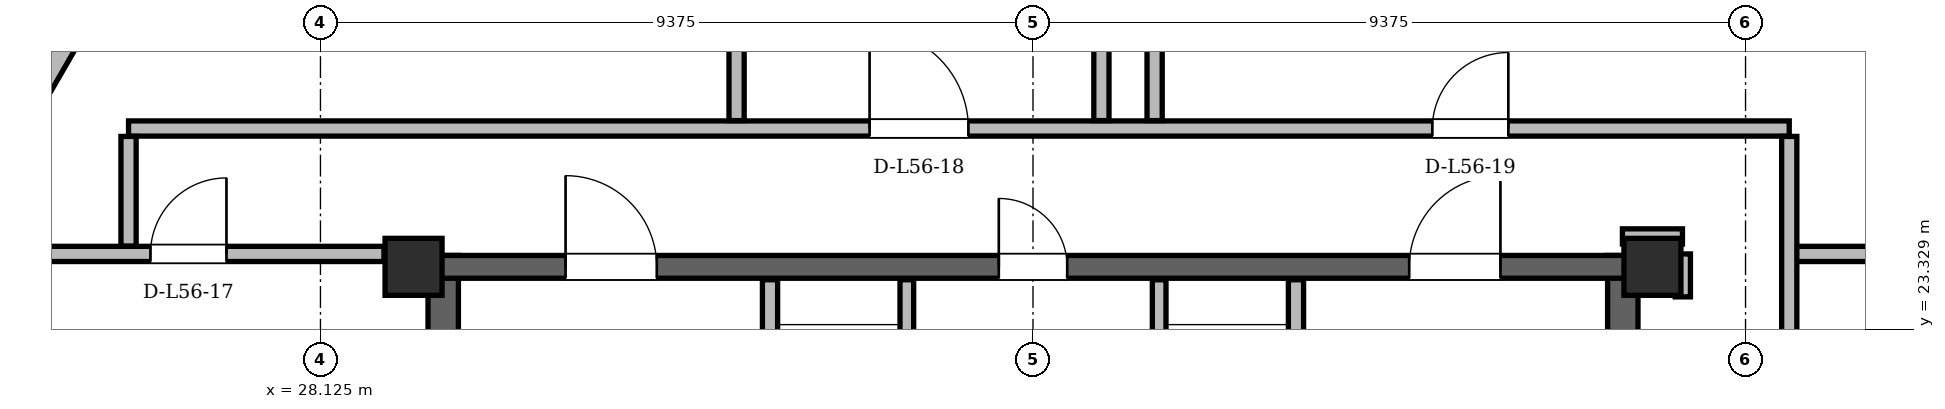
"""IFC4 building model, lengths in metres.
Left out: names, types, materials, properties, quantities, classifications, styles, units other than length and angle.
Written with IfcOpenShell. Run it as: python <this file> out.ifc"""

import sys

from ifc_helpers import new_model, si_unit, direction, frame, frame_2d, origin, origin_2d, place, context, subcontext, project, spatial, rectangle, hollow_rectangle, extrude, element, fill, save


model = new_model("IFC4")
c1 = context("Model", 3, precision=1e-05, world=origin(), true_north=direction((0.0, 1.0)))
c2 = subcontext(c1, "Body", "Model", "MODEL_VIEW")
j1 = project(units=[si_unit("LENGTHUNIT", "METRE"), si_unit("PLANEANGLEUNIT", "RADIAN")], contexts=[c1])
p1 = place(None, origin())
s1 = spatial("IfcSite", under=j1, at=p1, CompositionType="ELEMENT")
p2 = place(p1, origin())
s2 = spatial("IfcBuilding", under=s1, at=p2, CompositionType="ELEMENT")
p3 = place(p2, frame((0.0, 0.0, 212.7)))
s3 = spatial("IfcBuildingStorey", under=s2, at=p3, CompositionType="ELEMENT", Elevation=212.7)
for number, where, z_axis, x_axis in (
    (1, (45.65, 24.15, 0.0), (0.0, 0.0, 1.0), (1.0, 0.0, 0.0)),
    (2, (29.35, 24.15, 0.0), (0.0, 0.0, 1.0), (1.0, 0.0, 0.0)),
):
    element("IfcColumn", number, at=place(p3, frame(where, z_axis=z_axis, x_axis=x_axis)), inside=s3, PredefinedType="COLUMN", context=c2, shape_type="SweptSolid", body=[
        extrude(hollow_rectangle(XDim=0.75, YDim=0.75, WallThickness=0.06, at=origin_2d()), origin(), (0.0, 0.0, 1.0), 3.6),
    ])
for number, where, z_axis, x_axis in (
    (3, (29.74, 11.0, 0.0), (0.0, 0.0, 1.0), (0.0, 1.0, 0.0)),
    (4, (45.26, 11.0, 0.0), (0.0, 0.0, 1.0), (0.0, 1.0, 0.0)),
):
    element("IfcWall", number, at=place(p3, frame(where, z_axis=z_axis, x_axis=x_axis)), inside=s3, PredefinedType="SHEAR", context=c2, shape_type="SweptSolid", body=[
        extrude(rectangle(XDim=13.3, YDim=0.4, at=frame_2d((6.65, 0.0))), origin(), (0.0, 0.0, 1.0), 3.38),
    ])
p4 = place(p3, frame((29.65, 24.15, 0.0), z_axis=(0.0, 0.0, 1.0), x_axis=(1.0, 0.0, 0.0)))
e5 = element("IfcWall", 5, at=p4, inside=s3, PredefinedType="SHEAR", context=c2, shape_type="SweptSolid", body=[
    extrude(rectangle(XDim=15.7, YDim=0.3, at=frame_2d((7.85, 0.0))), origin(), (0.0, 0.0, 1.0), 3.38),
])
p5 = place(p4, frame((1.7, 0.0, 0.0)))
e6 = element("IfcOpeningElement", 6, at=p5, cuts=e5, PredefinedType="OPENING", context=c2, shape_type="SweptSolid", body=[
    extrude(rectangle(XDim=1.2, YDim=2.2, at=frame_2d((0.6, 1.1))), frame((0.0, 0.15, 0.0), z_axis=(0.0, -1.0, 0.0), x_axis=(1.0, 0.0, 0.0)), (0.0, 0.0, 1.0), 0.3),
])
p6 = place(p4, frame((12.8, 0.0, 0.0)))
e7 = element("IfcOpeningElement", 7, at=p6, cuts=e5, PredefinedType="OPENING", context=c2, shape_type="SweptSolid", body=[
    extrude(rectangle(XDim=1.2, YDim=2.2, at=frame_2d((0.6, 1.1))), frame((0.0, 0.15, 0.0), z_axis=(0.0, -1.0, 0.0), x_axis=(1.0, 0.0, 0.0)), (0.0, 0.0, 1.0), 0.3),
])
p7 = place(p4, frame((7.4, 0.0, 0.0)))
e8 = element("IfcOpeningElement", 8, at=p7, cuts=e5, PredefinedType="OPENING", context=c2, shape_type="SweptSolid", body=[
    extrude(rectangle(XDim=0.9, YDim=2.05, at=frame_2d((0.45, 1.025))), frame((0.0, 0.15, 0.0), z_axis=(0.0, -1.0, 0.0), x_axis=(1.0, 0.0, 0.0)), (0.0, 0.0, 1.0), 0.3),
])
p8 = place(p3, frame((59.201, 11.543, 0.0), z_axis=(0.0, 0.0, 1.0), x_axis=(-0.499999040053, 0.866025958009, 0.0)))
e9 = element("IfcWall", 9, at=p8, inside=s3, PredefinedType="SOLIDWALL", context=c2, shape_type="SweptSolid", body=[
    extrude(rectangle(XDim=36.523, YDim=0.29, at=frame_2d((18.261, 0.0))), origin(), (0.0, 0.0, 1.0), 2.677),
])
p9 = place(p8, frame((8.034, 0.0, 0.0)))
e10 = element("IfcOpeningElement", 10, at=p9, cuts=e9, PredefinedType="OPENING", context=c2, shape_type="SweptSolid", body=[
    extrude(rectangle(XDim=1.5, YDim=2.2, at=frame_2d((0.75, 1.1))), frame((0.0, 0.145, 0.0), z_axis=(0.0, -1.0, 0.0), x_axis=(1.0, 0.0, 0.0)), (0.0, 0.0, 1.0), 0.29),
])
p10 = place(p8, frame((31.594, 0.0, 0.0)))
e11 = element("IfcOpeningElement", 11, at=p10, cuts=e9, PredefinedType="OPENING", context=c2, shape_type="SweptSolid", body=[
    extrude(rectangle(XDim=1.5, YDim=2.2, at=frame_2d((0.75, 1.1))), frame((0.0, 0.145, 0.0), z_axis=(0.0, -1.0, 0.0), x_axis=(1.0, 0.0, 0.0)), (0.0, 0.0, 1.0), 0.29),
])
p11 = place(p8, frame((12.291, 0.0, 0.85)))
e12 = element("IfcOpeningElement", 12, at=p11, cuts=e9, PredefinedType="OPENING", context=c2, shape_type="SweptSolid", body=[
    extrude(rectangle(XDim=1.4, YDim=1.6, at=frame_2d((0.7, 0.8))), frame((0.0, 0.145, 0.0), z_axis=(0.0, -1.0, 0.0), x_axis=(1.0, 0.0, 0.0)), (0.0, 0.0, 1.0), 0.29),
])
p12 = place(p8, frame((2.252, 0.0, 0.85)))
e13 = element("IfcOpeningElement", 13, at=p12, cuts=e9, PredefinedType="OPENING", context=c2, shape_type="SweptSolid", body=[
    extrude(rectangle(XDim=1.2, YDim=1.48, at=frame_2d((0.6, 0.74))), frame((0.0, 0.145, 0.0), z_axis=(0.0, -1.0, 0.0), x_axis=(1.0, 0.0, 0.0)), (0.0, 0.0, 1.0), 0.29),
])
p13 = place(p8, frame((16.093, 0.0, 0.85)))
e14 = element("IfcOpeningElement", 14, at=p13, cuts=e9, PredefinedType="OPENING", context=c2, shape_type="SweptSolid", body=[
    extrude(rectangle(XDim=3.0, YDim=1.717, at=frame_2d((1.5, 0.858))), frame((0.0, 0.145, 0.0), z_axis=(0.0, -1.0, 0.0), x_axis=(1.0, 0.0, 0.0)), (0.0, 0.0, 1.0), 0.29),
])
p14 = place(p8, frame((23.458, 0.0, 0.85)))
e15 = element("IfcOpeningElement", 15, at=p14, cuts=e9, PredefinedType="OPENING", context=c2, shape_type="SweptSolid", body=[
    extrude(rectangle(XDim=1.2, YDim=1.48, at=frame_2d((0.6, 0.74))), frame((0.0, 0.145, 0.0), z_axis=(0.0, -1.0, 0.0), x_axis=(1.0, 0.0, 0.0)), (0.0, 0.0, 1.0), 0.29),
])
p15 = place(p8, frame((34.061, 0.0, 0.85)))
e16 = element("IfcOpeningElement", 16, at=p15, cuts=e9, PredefinedType="OPENING", context=c2, shape_type="SweptSolid", body=[
    extrude(rectangle(XDim=1.2, YDim=1.48, at=frame_2d((0.6, 0.74))), frame((0.0, 0.145, 0.0), z_axis=(0.0, -1.0, 0.0), x_axis=(1.0, 0.0, 0.0)), (0.0, 0.0, 1.0), 0.29),
])
p16 = place(p3, frame((34.06, 43.173, 0.0), z_axis=(0.0, 0.0, 1.0), x_axis=(-0.499999040053, -0.866025958009, 0.0)))
e17 = element("IfcWall", 17, at=p16, inside=s3, PredefinedType="SOLIDWALL", context=c2, shape_type="SweptSolid", body=[
    extrude(rectangle(XDim=36.523, YDim=0.29, at=frame_2d((18.261, 0.0))), origin(), (0.0, 0.0, 1.0), 2.677),
])
p17 = place(p16, frame((8.034, 0.0, 0.0)))
e18 = element("IfcOpeningElement", 18, at=p17, cuts=e17, PredefinedType="OPENING", context=c2, shape_type="SweptSolid", body=[
    extrude(rectangle(XDim=1.5, YDim=2.2, at=frame_2d((0.75, 1.1))), frame((0.0, 0.145, 0.0), z_axis=(0.0, -1.0, 0.0), x_axis=(1.0, 0.0, 0.0)), (0.0, 0.0, 1.0), 0.29),
])
p18 = place(p16, frame((28.233, 0.0, 0.0)))
e19 = element("IfcOpeningElement", 19, at=p18, cuts=e17, PredefinedType="OPENING", context=c2, shape_type="SweptSolid", body=[
    extrude(rectangle(XDim=1.5, YDim=2.2, at=frame_2d((0.75, 1.1))), frame((0.0, 0.145, 0.0), z_axis=(0.0, -1.0, 0.0), x_axis=(1.0, 0.0, 0.0)), (0.0, 0.0, 1.0), 0.29),
])
p19 = place(p16, frame((32.257, 0.0, 0.85)))
e20 = element("IfcOpeningElement", 20, at=p19, cuts=e17, PredefinedType="OPENING", context=c2, shape_type="SweptSolid", body=[
    extrude(rectangle(XDim=2.2, YDim=1.717, at=frame_2d((1.1, 0.858))), frame((0.0, 0.145, 0.0), z_axis=(0.0, -1.0, 0.0), x_axis=(1.0, 0.0, 0.0)), (0.0, 0.0, 1.0), 0.29),
])
p20 = place(p16, frame((22.716, 0.0, 0.85)))
e21 = element("IfcOpeningElement", 21, at=p20, cuts=e17, PredefinedType="OPENING", context=c2, shape_type="SweptSolid", body=[
    extrude(rectangle(XDim=1.2, YDim=1.48, at=frame_2d((0.6, 0.74))), frame((0.0, 0.145, 0.0), z_axis=(0.0, -1.0, 0.0), x_axis=(1.0, 0.0, 0.0)), (0.0, 0.0, 1.0), 0.29),
])
p21 = place(p16, frame((26.483, 0.0, 0.85)))
e22 = element("IfcOpeningElement", 22, at=p21, cuts=e17, PredefinedType="OPENING", context=c2, shape_type="SweptSolid", body=[
    extrude(rectangle(XDim=1.2, YDim=1.48, at=frame_2d((0.6, 0.74))), frame((0.0, 0.145, 0.0), z_axis=(0.0, -1.0, 0.0), x_axis=(1.0, 0.0, 0.0)), (0.0, 0.0, 1.0), 0.29),
])
p22 = place(p3, frame((34.04, 19.48, 0.0), z_axis=(0.0, 0.0, 1.0), x_axis=(0.0, 1.0, 0.0)))
e23 = element("IfcWall", 23, at=p22, inside=s3, PredefinedType="PARTITIONING", context=c2, shape_type="SweptSolid", body=[
    extrude(rectangle(XDim=4.5, YDim=0.2, at=frame_2d((2.25, 0.0))), origin(), (0.0, 0.0, 1.0), 3.38),
])
p23 = place(p22, frame((2.12, 0.0, 0.0)))
e24 = element("IfcOpeningElement", 24, at=p23, cuts=e23, PredefinedType="OPENING", context=c2, shape_type="SweptSolid", body=[
    extrude(rectangle(XDim=1.1, YDim=2.2, at=frame_2d((0.55, 1.1))), frame((0.0, 0.1, 0.0), z_axis=(0.0, -1.0, 0.0), x_axis=(1.0, 0.0, 0.0)), (0.0, 0.0, 1.0), 0.2),
])
p24 = place(p3, frame((35.84, 20.96, 0.0), z_axis=(0.0, 0.0, 1.0), x_axis=(0.0, 1.0, 0.0)))
e25 = element("IfcWall", 25, at=p24, inside=s3, PredefinedType="PARTITIONING", context=c2, shape_type="SweptSolid", body=[
    extrude(rectangle(XDim=3.02, YDim=0.18, at=frame_2d((1.51, 0.0))), origin(), (0.0, 0.0, 1.0), 3.38),
])
p25 = place(p3, frame((40.96, 19.48, 0.0), z_axis=(0.0, 0.0, 1.0), x_axis=(0.0, 1.0, 0.0)))
e26 = element("IfcWall", 26, at=p25, inside=s3, PredefinedType="PARTITIONING", context=c2, shape_type="SweptSolid", body=[
    extrude(rectangle(XDim=4.5, YDim=0.2, at=frame_2d((2.25, 0.0))), origin(), (0.0, 0.0, 1.0), 3.38),
])
p26 = place(p25, frame((2.12, 0.0, 0.0)))
e27 = element("IfcOpeningElement", 27, at=p26, cuts=e26, PredefinedType="OPENING", context=c2, shape_type="SweptSolid", body=[
    extrude(rectangle(XDim=1.1, YDim=2.2, at=frame_2d((0.55, 1.1))), frame((0.0, 0.1, 0.0), z_axis=(0.0, -1.0, 0.0), x_axis=(1.0, 0.0, 0.0)), (0.0, 0.0, 1.0), 0.2),
])
p27 = place(p3, frame((39.16, 20.96, 0.0), z_axis=(0.0, 0.0, 1.0), x_axis=(0.0, 1.0, 0.0)))
e28 = element("IfcWall", 28, at=p27, inside=s3, PredefinedType="PARTITIONING", context=c2, shape_type="SweptSolid", body=[
    extrude(rectangle(XDim=3.02, YDim=0.18, at=frame_2d((1.51, 0.0))), origin(), (0.0, 0.0, 1.0), 3.38),
])
p28 = place(p3, frame((23.348, 24.32, 0.0), z_axis=(0.0, 0.0, 1.0), x_axis=(1.0, 0.0, 0.0)))
e29 = element("IfcWall", 29, at=p28, inside=s3, PredefinedType="PARTITIONING", context=c2, shape_type="SweptSolid", body=[
    extrude(rectangle(XDim=5.612, YDim=0.2, at=frame_2d((2.806, 0.0))), origin(), (0.0, 0.0, 1.0), 3.38),
])
p29 = place(p28, frame((2.54, 0.0, 0.0)))
e30 = element("IfcOpeningElement", 30, at=p29, cuts=e29, PredefinedType="OPENING", context=c2, shape_type="SweptSolid", body=[
    extrude(rectangle(XDim=1.0, YDim=2.18, at=frame_2d((0.5, 1.09))), frame((0.0, 0.1, 0.0), z_axis=(0.0, -1.0, 0.0), x_axis=(1.0, 0.0, 0.0)), (0.0, 0.0, 1.0), 0.2),
])
p30 = place(p3, frame((47.45, 24.32, 0.0), z_axis=(0.0, 0.0, 1.0), x_axis=(1.0, 0.0, 0.0)))
e31 = element("IfcWall", 31, at=p30, inside=s3, PredefinedType="PARTITIONING", context=c2, shape_type="SweptSolid", body=[
    extrude(rectangle(XDim=4.202, YDim=0.2, at=frame_2d((2.101, 0.0))), origin(), (0.0, 0.0, 1.0), 3.38),
])
p31 = place(p3, frame((45.255, 24.55, 0.0), z_axis=(0.0, 0.0, 1.0), x_axis=(1.0, 0.0, 0.0)))
e32 = element("IfcWall", 32, at=p31, inside=s3, PredefinedType="PARTITIONING", context=c2, shape_type="SweptSolid", body=[
    extrude(rectangle(XDim=0.79, YDim=0.2, at=frame_2d((0.395, 0.0))), origin(), (0.0, 0.0, 1.0), 2.913),
])
p32 = place(p3, frame((25.6, 25.97, 0.0), z_axis=(0.0, 0.0, 1.0), x_axis=(1.0, 0.0, 0.0)))
e33 = element("IfcWall", 33, at=p32, inside=s3, PredefinedType="PARTITIONING", context=c2, shape_type="SweptSolid", body=[
    extrude(rectangle(XDim=21.85, YDim=0.2, at=frame_2d((10.925, 0.0))), origin(), (0.0, 0.0, 1.0), 2.913),
])
p33 = place(p32, frame((9.75, 0.0, 0.0)))
e34 = element("IfcOpeningElement", 34, at=p33, cuts=e33, PredefinedType="OPENING", context=c2, shape_type="SweptSolid", body=[
    extrude(rectangle(XDim=1.3, YDim=2.2, at=frame_2d((0.65, 1.1))), frame((0.0, 0.1, 0.0), z_axis=(0.0, -1.0, 0.0), x_axis=(1.0, 0.0, 0.0)), (0.0, 0.0, 1.0), 0.2),
])
p34 = place(p32, frame((17.154, 0.0, 0.0)))
e35 = element("IfcOpeningElement", 35, at=p34, cuts=e33, PredefinedType="OPENING", context=c2, shape_type="SweptSolid", body=[
    extrude(rectangle(XDim=1.0, YDim=2.18, at=frame_2d((0.5, 1.09))), frame((0.0, 0.1, 0.0), z_axis=(0.0, -1.0, 0.0), x_axis=(1.0, 0.0, 0.0)), (0.0, 0.0, 1.0), 0.2),
])
p35 = place(p3, frame((25.6, 24.424, 0.0), z_axis=(0.0, 0.0, 1.0), x_axis=(0.0, 1.0, 0.0)))
e36 = element("IfcWall", 36, at=p35, inside=s3, PredefinedType="PARTITIONING", context=c2, shape_type="SweptSolid", body=[
    extrude(rectangle(XDim=1.442, YDim=0.2, at=frame_2d((0.721, 0.0))), origin(), (0.0, 0.0, 1.0), 3.38),
])
for number, where, z_axis, x_axis in (
    (37, (33.6, 26.074, 0.0), (0.0, 0.0, 1.0), (0.0, 1.0, 0.0)),
    (38, (38.4, 26.074, 0.0), (0.0, 0.0, 1.0), (0.0, 1.0, 0.0)),
):
    element("IfcWall", number, at=place(p3, frame(where, z_axis=z_axis, x_axis=x_axis)), inside=s3, PredefinedType="PARTITIONING", context=c2, shape_type="SweptSolid", body=[
        extrude(rectangle(XDim=4.292, YDim=0.2, at=frame_2d((2.146, 0.0))), origin(), (0.0, 0.0, 1.0), 3.38),
    ])
p36 = place(p3, frame((39.1, 26.074, 0.0), z_axis=(0.0, 0.0, 1.0), x_axis=(0.0, 1.0, 0.0)))
e39 = element("IfcWall", 39, at=p36, inside=s3, PredefinedType="PARTITIONING", context=c2, shape_type="SweptSolid", body=[
    extrude(rectangle(XDim=16.949, YDim=0.2, at=frame_2d((8.475, 0.0))), origin(), (0.0, 0.0, 1.0), 3.38),
])
p37 = place(p3, frame((46.05, 23.755, 0.0), z_axis=(0.0, 0.0, 1.0), x_axis=(0.0, 1.0, 0.0)))
e40 = element("IfcWall", 40, at=p37, inside=s3, PredefinedType="PARTITIONING", context=c2, shape_type="SweptSolid", body=[
    extrude(rectangle(XDim=0.565, YDim=0.2, at=frame_2d((0.283, 0.0))), origin(), (0.0, 0.0, 1.0), 3.38),
])
p38 = place(p3, frame((47.45, 9.404, 0.0), z_axis=(0.0, 0.0, 1.0), x_axis=(0.0, 1.0, 0.0)))
e41 = element("IfcWall", 41, at=p38, inside=s3, PredefinedType="PARTITIONING", context=c2, shape_type="SweptSolid", body=[
    extrude(rectangle(XDim=16.462, YDim=0.2, at=frame_2d((8.231, 0.0))), origin(), (0.0, 0.0, 1.0), 2.913),
])
p39 = place(p38, frame((9.496, 0.0, 0.0)))
e42 = element("IfcOpeningElement", 42, at=p39, cuts=e41, PredefinedType="OPENING", context=c2, shape_type="SweptSolid", body=[
    extrude(rectangle(XDim=1.0, YDim=2.18, at=frame_2d((0.5, 1.09))), frame((0.0, 0.1, 0.0), z_axis=(0.0, -1.0, 0.0), x_axis=(1.0, 0.0, 0.0)), (0.0, 0.0, 1.0), 0.2),
])
p40 = place(p5, origin())
e43 = element("IfcDoor", 43, at=p40, inside=s3, OperationType="SINGLE_SWING_LEFT", PredefinedType="DOOR", context=c2, shape_type="SweptSolid", body=[
    extrude(rectangle(XDim=1.2, YDim=2.2, at=frame_2d((0.6, 1.1))), frame((0.0, 0.025, 0.0), z_axis=(0.0, -1.0, 0.0), x_axis=(1.0, 0.0, 0.0)), (0.0, 0.0, 1.0), 0.05),
])
fill(e6, e43)
p41 = place(p6, origin())
e44 = element("IfcDoor", 44, at=p41, inside=s3, OperationType="SINGLE_SWING_RIGHT", PredefinedType="DOOR", context=c2, shape_type="SweptSolid", body=[
    extrude(rectangle(XDim=1.2, YDim=2.2, at=frame_2d((0.6, 1.1))), frame((0.0, 0.025, 0.0), z_axis=(0.0, -1.0, 0.0), x_axis=(1.0, 0.0, 0.0)), (0.0, 0.0, 1.0), 0.05),
])
fill(e7, e44)
p42 = place(p7, origin())
e45 = element("IfcDoor", 45, at=p42, inside=s3, OperationType="SINGLE_SWING_LEFT", PredefinedType="DOOR", context=c2, shape_type="SweptSolid", body=[
    extrude(rectangle(XDim=0.9, YDim=2.05, at=frame_2d((0.45, 1.025))), frame((0.0, 0.025, 0.0), z_axis=(0.0, -1.0, 0.0), x_axis=(1.0, 0.0, 0.0)), (0.0, 0.0, 1.0), 0.05),
])
fill(e8, e45)
p43 = place(p29, origin())
e46 = element("IfcDoor", 46, at=p43, inside=s3, OperationType="SINGLE_SWING_RIGHT", PredefinedType="DOOR", context=c2, shape_type="SweptSolid", body=[
    extrude(rectangle(XDim=1.0, YDim=2.18, at=frame_2d((0.5, 1.09))), frame((0.0, 0.025, 0.0), z_axis=(0.0, -1.0, 0.0), x_axis=(1.0, 0.0, 0.0)), (0.0, 0.0, 1.0), 0.05),
])
fill(e30, e46)
p44 = place(p33, origin())
e47 = element("IfcDoor", 47, at=p44, inside=s3, OperationType="SINGLE_SWING_LEFT", PredefinedType="DOOR", context=c2, shape_type="SweptSolid", body=[
    extrude(rectangle(XDim=1.3, YDim=2.2, at=frame_2d((0.65, 1.1))), frame((0.0, 0.025, 0.0), z_axis=(0.0, -1.0, 0.0), x_axis=(1.0, 0.0, 0.0)), (0.0, 0.0, 1.0), 0.05),
])
fill(e34, e47)
p45 = place(p34, origin())
e48 = element("IfcDoor", 48, at=p45, inside=s3, OperationType="SINGLE_SWING_RIGHT", PredefinedType="DOOR", context=c2, shape_type="SweptSolid", body=[
    extrude(rectangle(XDim=1.0, YDim=2.18, at=frame_2d((0.5, 1.09))), frame((0.0, 0.025, 0.0), z_axis=(0.0, -1.0, 0.0), x_axis=(1.0, 0.0, 0.0)), (0.0, 0.0, 1.0), 0.05),
])
fill(e35, e48)
save(model, sys.argv[1])
